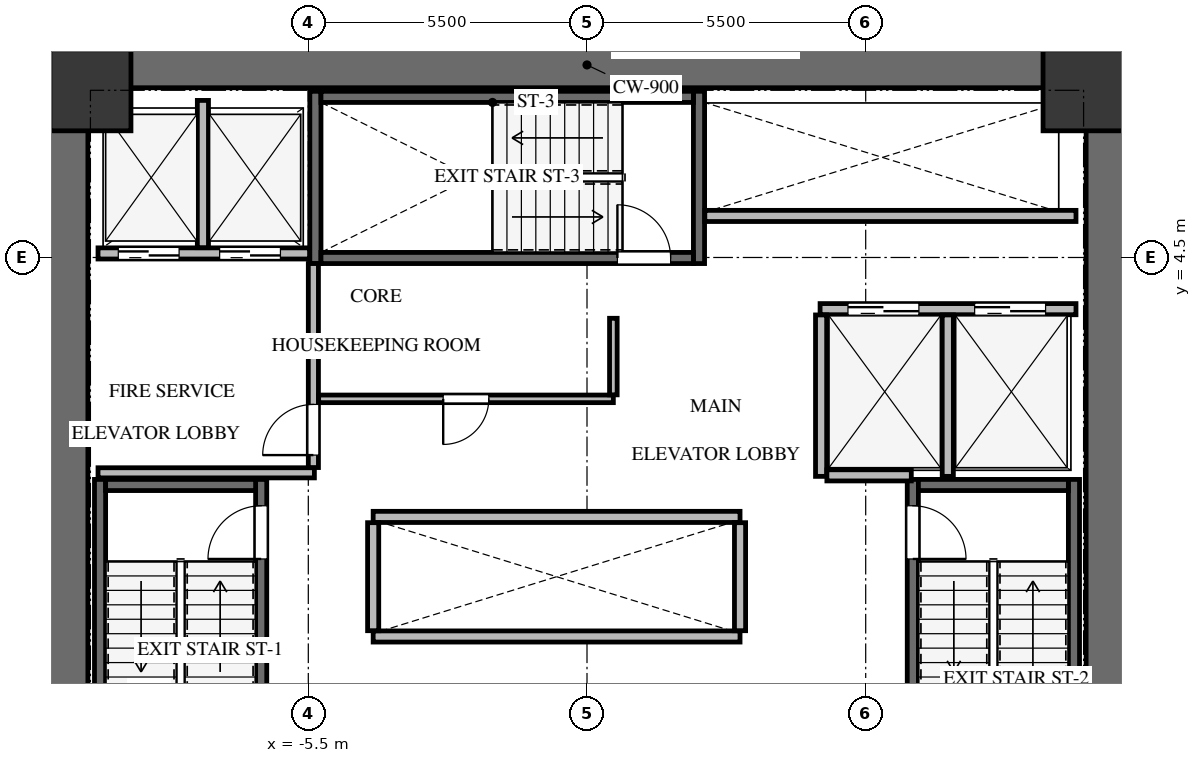
"""IFC4 building model, lengths in metres.
Left out: names, types, materials, properties, quantities, classifications, styles, units other than length and angle.
Written with IfcOpenShell. Run it as: python <this file> out.ifc"""

import sys

from ifc_helpers import new_model, si_unit, direction, frame, frame_2d, origin, origin_2d, place, context, subcontext, project, spatial, rectangle, extrude, source, transform, mapped, element, fill, save


model = new_model("IFC4")
c1 = context("Model", 3, precision=1e-05, world=origin(), true_north=direction((0.0, 1.0)))
c2 = subcontext(c1, "Body", "Model", "MODEL_VIEW")
j1 = project(units=[si_unit("LENGTHUNIT", "METRE"), si_unit("PLANEANGLEUNIT", "RADIAN")], contexts=[c1])
p1 = place(None, origin())
s1 = spatial("IfcSite", under=j1, at=p1, CompositionType="ELEMENT")
p2 = place(p1, origin())
s2 = spatial("IfcBuilding", under=s1, at=p2, CompositionType="ELEMENT")
p3 = place(p2, frame((0.0, 0.0, 72.0)))
s3 = spatial("IfcBuildingStorey", under=s2, at=p3, CompositionType="ELEMENT", Elevation=72.0)
for number, where, z_axis, x_axis in (
    (1, (-10.3, -8.75, 0.0), (0.0, 0.0, 1.0), (0.0, 1.0, 0.0)),
    (2, (10.3, -8.75, 0.0), (0.0, 0.0, 1.0), (0.0, 1.0, 0.0)),
):
    element("IfcWall", number, at=place(p3, frame(where, z_axis=z_axis, x_axis=x_axis)), inside=s3, PredefinedType="SHEAR", context=c2, shape_type="SweptSolid", body=[
        extrude(rectangle(XDim=17.5, YDim=0.9, at=frame_2d((8.75, 0.0))), origin(), (0.0, 0.0, 1.0), 3.3),
    ])
p4 = place(p3, frame((-9.85, 8.3, 0.0), z_axis=(0.0, 0.0, 1.0), x_axis=(1.0, 0.0, 0.0)))
e3 = element("IfcWall", 3, at=p4, inside=s3, PredefinedType="SHEAR", context=c2, shape_type="SweptSolid", body=[
    extrude(rectangle(XDim=19.7, YDim=0.9, at=frame_2d((9.85, 0.0))), origin(), (0.0, 0.0, 1.0), 3.3),
])
p5 = place(p3, frame((-6.43, -7.77, -0.24), z_axis=(0.0, 0.0, 1.0), x_axis=(0.0, 1.0, 0.0)))
e4 = element("IfcWall", 4, at=p5, inside=s3, PredefinedType="SHEAR", context=c2, shape_type="SweptSolid", body=[
    extrude(rectangle(XDim=7.89, YDim=0.22, at=frame_2d((3.945, 0.0))), origin(), (0.0, 0.0, 1.0), 3.3),
])
p6 = place(p5, frame((6.32, 0.0, 0.0)))
e5 = element("IfcOpeningElement", 5, at=p6, cuts=e4, PredefinedType="OPENING", context=c2, shape_type="SweptSolid", body=[
    extrude(rectangle(XDim=1.05, YDim=2.15, at=frame_2d((0.525, 1.075))), frame((0.0, 0.12, 0.0), z_axis=(0.0, -1.0, 0.0), x_axis=(1.0, 0.0, 0.0)), (0.0, 0.0, 1.0), 0.24),
])
p7 = place(p3, frame((-9.61, 0.12, -0.24), z_axis=(0.0, 0.0, 1.0), x_axis=(0.0, -1.0, 0.0)))
e6 = element("IfcWall", 6, at=p7, inside=s3, PredefinedType="SHEAR", context=c2, shape_type="SweptSolid", body=[
    extrude(rectangle(XDim=7.89, YDim=0.22, at=frame_2d((3.945, 0.0))), origin(), (0.0, 0.0, 1.0), 3.3),
])
p8 = place(p3, frame((-6.54, 0.01, -0.24), z_axis=(0.0, 0.0, 1.0), x_axis=(-1.0, 0.0, 0.0)))
e7 = element("IfcWall", 7, at=p8, inside=s3, PredefinedType="SHEAR", context=c2, shape_type="SweptSolid", body=[
    extrude(rectangle(XDim=2.96, YDim=0.22, at=frame_2d((1.48, 0.0))), origin(), (0.0, 0.0, 1.0), 3.3),
])
p9 = place(p3, frame((9.61, -7.77, -0.24), z_axis=(0.0, 0.0, 1.0), x_axis=(0.0, 1.0, 0.0)))
e8 = element("IfcWall", 8, at=p9, inside=s3, PredefinedType="SHEAR", context=c2, shape_type="SweptSolid", body=[
    extrude(rectangle(XDim=7.89, YDim=0.22, at=frame_2d((3.945, 0.0))), origin(), (0.0, 0.0, 1.0), 3.3),
])
p10 = place(p3, frame((6.43, 0.12, -0.24), z_axis=(0.0, 0.0, 1.0), x_axis=(0.0, -1.0, 0.0)))
e9 = element("IfcWall", 9, at=p10, inside=s3, PredefinedType="SHEAR", context=c2, shape_type="SweptSolid", body=[
    extrude(rectangle(XDim=7.89, YDim=0.22, at=frame_2d((3.945, 0.0))), origin(), (0.0, 0.0, 1.0), 3.3),
])
p11 = place(p10, frame((0.52, 0.0, 0.0)))
e10 = element("IfcOpeningElement", 10, at=p11, cuts=e9, PredefinedType="OPENING", context=c2, shape_type="SweptSolid", body=[
    extrude(rectangle(XDim=1.05, YDim=2.15, at=frame_2d((0.525, 1.075))), frame((0.0, 0.12, 0.0), z_axis=(0.0, -1.0, 0.0), x_axis=(1.0, 0.0, 0.0)), (0.0, 0.0, 1.0), 0.24),
])
p12 = place(p3, frame((9.5, 0.01, -0.24), z_axis=(0.0, 0.0, 1.0), x_axis=(-1.0, 0.0, 0.0)))
e11 = element("IfcWall", 11, at=p12, inside=s3, PredefinedType="SHEAR", context=c2, shape_type="SweptSolid", body=[
    extrude(rectangle(XDim=2.96, YDim=0.22, at=frame_2d((1.48, 0.0))), origin(), (0.0, 0.0, 1.0), 3.3),
])
for number, where, z_axis, x_axis in (
    (12, (2.21, 4.38, -0.24), (0.0, 0.0, 1.0), (0.0, 1.0, 0.0)),
    (13, (-5.36, 7.78, -0.24), (0.0, 0.0, 1.0), (0.0, -1.0, 0.0)),
):
    element("IfcWall", number, at=place(p3, frame(where, z_axis=z_axis, x_axis=x_axis)), inside=s3, PredefinedType="SHEAR", context=c2, shape_type="SweptSolid", body=[
        extrude(rectangle(XDim=3.4, YDim=0.22, at=frame_2d((1.7, 0.0))), origin(), (0.0, 0.0, 1.0), 3.3),
    ])
p13 = place(p3, frame((-5.25, 4.49, -0.24), z_axis=(0.0, 0.0, 1.0), x_axis=(1.0, 0.0, 0.0)))
e14 = element("IfcWall", 14, at=p13, inside=s3, PredefinedType="SHEAR", context=c2, shape_type="SweptSolid", body=[
    extrude(rectangle(XDim=7.35, YDim=0.22, at=frame_2d((3.675, 0.0))), origin(), (0.0, 0.0, 1.0), 3.3),
])
p14 = place(p13, frame((5.85, 0.0, 0.0)))
e15 = element("IfcOpeningElement", 15, at=p14, cuts=e14, PredefinedType="OPENING", context=c2, shape_type="SweptSolid", body=[
    extrude(rectangle(XDim=1.05, YDim=2.15, at=frame_2d((0.525, 1.075))), frame((0.0, 0.12, 0.0), z_axis=(0.0, -1.0, 0.0), x_axis=(1.0, 0.0, 0.0)), (0.0, 0.0, 1.0), 0.24),
])
p15 = place(p3, frame((2.1, 7.67, -0.24), z_axis=(0.0, 0.0, 1.0), x_axis=(-1.0, 0.0, 0.0)))
e16 = element("IfcWall", 16, at=p15, inside=s3, PredefinedType="SHEAR", context=c2, shape_type="SweptSolid", body=[
    extrude(rectangle(XDim=7.35, YDim=0.22, at=frame_2d((3.675, 0.0))), origin(), (0.0, 0.0, 1.0), 3.3),
])
m1 = source(origin(), c2, "Body", "SweptSolid", [
    extrude(rectangle(XDim=1.6, YDim=1.6, at=origin_2d()), origin(), (0.0, 0.0, 1.0), 3.3),
])
for number, where, z_axis, x_axis in (
    (17, (9.8, 7.8, -0.24), (0.0, 0.0, 1.0), (1.0, 0.0, 0.0)),
    (18, (-9.8, 7.8, -0.24), (0.0, 0.0, 1.0), (1.0, 0.0, 0.0)),
):
    element("IfcColumn", number, at=place(p3, frame(where, z_axis=z_axis, x_axis=x_axis)), inside=s3, PredefinedType="COLUMN", context=c2, shape_type="MappedRepresentation", body=[
        mapped(m1, transform((0.0, 0.0, 0.0), x_axis=(1.0, 0.0, 0.0), y_axis=(0.0, 1.0, 0.0), z_axis=(0.0, 0.0, 1.0), scale=1.0)),
    ])
p16 = place(p3, frame((-9.65, 4.58, 0.0), z_axis=(0.0, 0.0, 1.0), x_axis=(1.0, 0.0, 0.0)))
e19 = element("IfcWall", 19, at=p16, inside=s3, PredefinedType="SOLIDWALL", context=c2, shape_type="SweptSolid", body=[
    extrude(rectangle(XDim=4.175, YDim=0.22, at=frame_2d((2.087, 0.0))), origin(), (0.0, 0.0, 1.0), 3.045),
])
p17 = place(p16, frame((0.4, 0.0, 0.0)))
e20 = element("IfcOpeningElement", 20, at=p17, cuts=e19, PredefinedType="OPENING", context=c2, shape_type="SweptSolid", body=[
    extrude(rectangle(XDim=1.2, YDim=2.15, at=frame_2d((0.6, 1.075))), frame((0.0, 0.12, 0.0), z_axis=(0.0, -1.0, 0.0), x_axis=(1.0, 0.0, 0.0)), (0.0, 0.0, 1.0), 0.24),
])
p18 = place(p16, frame((2.4, 0.0, 0.0)))
e21 = element("IfcOpeningElement", 21, at=p18, cuts=e19, PredefinedType="OPENING", context=c2, shape_type="SweptSolid", body=[
    extrude(rectangle(XDim=1.2, YDim=2.15, at=frame_2d((0.6, 1.075))), frame((0.0, 0.12, 0.0), z_axis=(0.0, -1.0, 0.0), x_axis=(1.0, 0.0, 0.0)), (0.0, 0.0, 1.0), 0.24),
])
p19 = place(p3, frame((-7.58, 4.694, 0.0), z_axis=(0.0, 0.0, 1.0), x_axis=(0.0, 1.0, 0.0)))
e22 = element("IfcWall", 22, at=p19, inside=s3, PredefinedType="SOLIDWALL", context=c2, shape_type="SweptSolid", body=[
    extrude(rectangle(XDim=2.906, YDim=0.22, at=frame_2d((1.453, 0.0))), origin(), (0.0, 0.0, 1.0), 3.045),
])
p20 = place(p3, frame((-9.65, 0.25, 0.0), z_axis=(0.0, 0.0, 1.0), x_axis=(1.0, 0.0, 0.0)))
e23 = element("IfcWall", 23, at=p20, inside=s3, PredefinedType="SOLIDWALL", context=c2, shape_type="SweptSolid", body=[
    extrude(rectangle(XDim=4.27, YDim=0.2, at=frame_2d((2.135, 0.0))), origin(), (0.0, 0.0, 1.0), 3.045),
])
p21 = place(p3, frame((-5.4, 0.354, 0.0), z_axis=(0.0, 0.0, 1.0), x_axis=(0.0, 1.0, 0.0)))
e24 = element("IfcWall", 24, at=p21, inside=s3, PredefinedType="SOLIDWALL", context=c2, shape_type="SweptSolid", body=[
    extrude(rectangle(XDim=4.026, YDim=0.2, at=frame_2d((2.013, 0.0))), origin(), (0.0, 0.0, 1.0), 3.045),
])
p22 = place(p21, frame((0.246, 0.0, 0.0)))
e25 = element("IfcOpeningElement", 25, at=p22, cuts=e24, PredefinedType="OPENING", context=c2, shape_type="SweptSolid", body=[
    extrude(rectangle(XDim=1.0, YDim=2.15, at=frame_2d((0.5, 1.075))), frame((0.0, 0.11, 0.0), z_axis=(0.0, -1.0, 0.0), x_axis=(1.0, 0.0, 0.0)), (0.0, 0.0, 1.0), 0.22),
])
p23 = place(p3, frame((4.6, 3.48, 0.0), z_axis=(0.0, 0.0, 1.0), x_axis=(1.0, 0.0, 0.0)))
e26 = element("IfcWall", 26, at=p23, inside=s3, PredefinedType="SOLIDWALL", context=c2, shape_type="SweptSolid", body=[
    extrude(rectangle(XDim=5.05, YDim=0.22, at=frame_2d((2.525, 0.0))), origin(), (0.0, 0.0, 1.0), 3.045),
])
p24 = place(p23, frame((0.55, 0.0, 0.0)))
e27 = element("IfcOpeningElement", 27, at=p24, cuts=e26, PredefinedType="OPENING", context=c2, shape_type="SweptSolid", body=[
    extrude(rectangle(XDim=1.4, YDim=2.15, at=frame_2d((0.7, 1.075))), frame((0.0, 0.12, 0.0), z_axis=(0.0, -1.0, 0.0), x_axis=(1.0, 0.0, 0.0)), (0.0, 0.0, 1.0), 0.24),
])
p25 = place(p23, frame((3.05, 0.0, 0.0)))
e28 = element("IfcOpeningElement", 28, at=p25, cuts=e26, PredefinedType="OPENING", context=c2, shape_type="SweptSolid", body=[
    extrude(rectangle(XDim=1.4, YDim=2.15, at=frame_2d((0.7, 1.075))), frame((0.0, 0.12, 0.0), z_axis=(0.0, -1.0, 0.0), x_axis=(1.0, 0.0, 0.0)), (0.0, 0.0, 1.0), 0.24),
])
for number, where, z_axis, x_axis in (
    (29, (4.62, 0.18, 0.0), (0.0, 0.0, 1.0), (0.0, 1.0, 0.0)),
    (30, (7.12, 0.18, 0.0), (0.0, 0.0, 1.0), (0.0, 1.0, 0.0)),
):
    element("IfcWall", number, at=place(p3, frame(where, z_axis=z_axis, x_axis=x_axis)), inside=s3, PredefinedType="SOLIDWALL", context=c2, shape_type="SweptSolid", body=[
        extrude(rectangle(XDim=3.186, YDim=0.22, at=frame_2d((1.593, 0.0))), origin(), (0.0, 0.0, 1.0), 3.045),
    ])
p26 = place(p3, frame((4.734, 0.2, 0.0), z_axis=(0.0, 0.0, 1.0), x_axis=(1.0, 0.0, 0.0)))
e31 = element("IfcWall", 31, at=p26, inside=s3, PredefinedType="SOLIDWALL", context=c2, shape_type="SweptSolid", body=[
    extrude(rectangle(XDim=1.666, YDim=0.22, at=frame_2d((0.833, 0.0))), origin(), (0.0, 0.0, 1.0), 3.045),
])
for number, where, z_axis, x_axis in (
    (32, (-4.22, -2.98, 0.0), (0.0, 0.0, 1.0), (1.0, 0.0, 0.0)),
    (33, (-4.22, -0.62, 0.0), (0.0, 0.0, 1.0), (1.0, 0.0, 0.0)),
):
    element("IfcWall", number, at=place(p3, frame(where, z_axis=z_axis, x_axis=x_axis)), inside=s3, PredefinedType="SOLIDWALL", context=c2, shape_type="SweptSolid", body=[
        extrude(rectangle(XDim=7.24, YDim=0.22, at=frame_2d((3.62, 0.0))), origin(), (0.0, 0.0, 1.0), 3.045),
    ])
for number, where, z_axis, x_axis in (
    (34, (-4.22, -2.866, 0.0), (0.0, 0.0, 1.0), (0.0, 1.0, 0.0)),
    (35, (3.02, -2.866, 0.0), (0.0, 0.0, 1.0), (0.0, 1.0, 0.0)),
):
    element("IfcWall", number, at=place(p3, frame(where, z_axis=z_axis, x_axis=x_axis)), inside=s3, PredefinedType="SOLIDWALL", context=c2, shape_type="SweptSolid", body=[
        extrude(rectangle(XDim=2.132, YDim=0.22, at=frame_2d((1.066, 0.0))), origin(), (0.0, 0.0, 1.0), 3.045),
    ])
p27 = place(p3, frame((2.325, 5.32, 0.0), z_axis=(0.0, 0.0, 1.0), x_axis=(1.0, 0.0, 0.0)))
e36 = element("IfcWall", 36, at=p27, inside=s3, PredefinedType="SOLIDWALL", context=c2, shape_type="SweptSolid", body=[
    extrude(rectangle(XDim=7.325, YDim=0.22, at=frame_2d((3.663, 0.0))), origin(), (0.0, 0.0, 1.0), 3.045),
])
p28 = place(p3, frame((0.52, 1.71, 0.0), z_axis=(0.0, 0.0, 1.0), x_axis=(-1.0, 0.0, 0.0)))
e37 = element("IfcWall", 37, at=p28, inside=s3, PredefinedType="PARTITIONING", context=c2, shape_type="SweptSolid", body=[
    extrude(rectangle(XDim=5.816, YDim=0.15, at=frame_2d((2.908, 0.0))), origin(), (0.0, 0.0, 1.0), 3.045),
])
p29 = place(p28, frame((2.458, 0.0, 0.0)))
e38 = element("IfcOpeningElement", 38, at=p29, cuts=e37, PredefinedType="OPENING", context=c2, shape_type="SweptSolid", body=[
    extrude(rectangle(XDim=0.9, YDim=2.05, at=frame_2d((0.45, 1.025))), frame((0.0, 0.085, 0.0), z_axis=(0.0, -1.0, 0.0), x_axis=(1.0, 0.0, 0.0)), (0.0, 0.0, 1.0), 0.17),
])
p30 = place(p3, frame((0.52, 3.3, 0.0), z_axis=(0.0, 0.0, 1.0), x_axis=(0.0, -1.0, 0.0)))
e39 = element("IfcWall", 39, at=p30, inside=s3, PredefinedType="PARTITIONING", context=c2, shape_type="SweptSolid", body=[
    extrude(rectangle(XDim=1.511, YDim=0.15, at=frame_2d((0.755, 0.0))), origin(), (0.0, 0.0, 1.0), 3.045),
])
m2 = source(origin(), c2, "Body", "SweptSolid", [
    extrude(rectangle(XDim=1.05, YDim=2.15, at=frame_2d((0.525, 1.075))), frame((0.0, 0.025, 0.0), z_axis=(0.0, -1.0, 0.0), x_axis=(1.0, 0.0, 0.0)), (0.0, 0.0, 1.0), 0.05),
])
p31 = place(p6, origin())
e40 = element("IfcDoor", 40, at=p31, inside=s3, OperationType="SINGLE_SWING_LEFT", PredefinedType="DOOR", context=c2, shape_type="MappedRepresentation", body=[
    mapped(m2, transform((0.0, 0.0, 0.0), x_axis=(1.0, 0.0, 0.0), y_axis=(0.0, 1.0, 0.0), z_axis=(0.0, 0.0, 1.0), scale=1.0)),
])
fill(e5, e40)
m3 = source(origin(), c2, "Body", "SweptSolid", [
    extrude(rectangle(XDim=1.05, YDim=2.15, at=frame_2d((0.525, 1.075))), frame((0.0, 0.025, 0.0), z_axis=(0.0, -1.0, 0.0), x_axis=(1.0, 0.0, 0.0)), (0.0, 0.0, 1.0), 0.05),
])
p32 = place(p11, origin())
e41 = element("IfcDoor", 41, at=p32, inside=s3, OperationType="SINGLE_SWING_RIGHT", PredefinedType="DOOR", context=c2, shape_type="MappedRepresentation", body=[
    mapped(m3, transform((0.0, 0.0, 0.0), x_axis=(1.0, 0.0, 0.0), y_axis=(0.0, 1.0, 0.0), z_axis=(0.0, 0.0, 1.0), scale=1.0)),
])
fill(e10, e41)
p33 = place(p14, origin())
e42 = element("IfcDoor", 42, at=p33, inside=s3, OperationType="SINGLE_SWING_LEFT", PredefinedType="DOOR", context=c2, shape_type="MappedRepresentation", body=[
    mapped(m2, transform((0.0, 0.0, 0.0), x_axis=(1.0, 0.0, 0.0), y_axis=(0.0, 1.0, 0.0), z_axis=(0.0, 0.0, 1.0), scale=1.0)),
])
fill(e15, e42)
m4 = source(origin(), c2, "Body", "SweptSolid", [
    extrude(rectangle(XDim=1.2, YDim=2.15, at=frame_2d((0.6, 1.075))), frame((0.0, 0.025, 0.0), z_axis=(0.0, -1.0, 0.0), x_axis=(1.0, 0.0, 0.0)), (0.0, 0.0, 1.0), 0.05),
])
p34 = place(p17, origin())
e43 = element("IfcDoor", 43, at=p34, inside=s3, OperationType="DOUBLE_DOOR_SLIDING", PredefinedType="DOOR", context=c2, shape_type="MappedRepresentation", body=[
    mapped(m4, transform((0.0, 0.0, 0.0), x_axis=(1.0, 0.0, 0.0), y_axis=(0.0, 1.0, 0.0), z_axis=(0.0, 0.0, 1.0), scale=1.0)),
])
fill(e20, e43)
p35 = place(p18, origin())
e44 = element("IfcDoor", 44, at=p35, inside=s3, OperationType="DOUBLE_DOOR_SLIDING", PredefinedType="DOOR", context=c2, shape_type="MappedRepresentation", body=[
    mapped(m4, transform((0.0, 0.0, 0.0), x_axis=(1.0, 0.0, 0.0), y_axis=(0.0, 1.0, 0.0), z_axis=(0.0, 0.0, 1.0), scale=1.0)),
])
fill(e21, e44)
m5 = source(origin(), c2, "Body", "SweptSolid", [
    extrude(rectangle(XDim=1.0, YDim=2.15, at=frame_2d((0.5, 1.075))), frame((0.0, 0.025, 0.0), z_axis=(0.0, -1.0, 0.0), x_axis=(1.0, 0.0, 0.0)), (0.0, 0.0, 1.0), 0.05),
])
p36 = place(p22, origin())
e45 = element("IfcDoor", 45, at=p36, inside=s3, OperationType="SINGLE_SWING_LEFT", PredefinedType="DOOR", context=c2, shape_type="MappedRepresentation", body=[
    mapped(m5, transform((0.0, 0.0, 0.0), x_axis=(1.0, 0.0, 0.0), y_axis=(0.0, 1.0, 0.0), z_axis=(0.0, 0.0, 1.0), scale=1.0)),
])
fill(e25, e45)
m6 = source(origin(), c2, "Body", "SweptSolid", [
    extrude(rectangle(XDim=1.4, YDim=2.15, at=frame_2d((0.7, 1.075))), frame((0.0, 0.025, 0.0), z_axis=(0.0, -1.0, 0.0), x_axis=(1.0, 0.0, 0.0)), (0.0, 0.0, 1.0), 0.05),
])
p37 = place(p24, origin())
e46 = element("IfcDoor", 46, at=p37, inside=s3, OperationType="DOUBLE_DOOR_SLIDING", PredefinedType="DOOR", context=c2, shape_type="MappedRepresentation", body=[
    mapped(m6, transform((0.0, 0.0, 0.0), x_axis=(1.0, 0.0, 0.0), y_axis=(0.0, 1.0, 0.0), z_axis=(0.0, 0.0, 1.0), scale=1.0)),
])
fill(e27, e46)
p38 = place(p25, origin())
e47 = element("IfcDoor", 47, at=p38, inside=s3, OperationType="DOUBLE_DOOR_SLIDING", PredefinedType="DOOR", context=c2, shape_type="MappedRepresentation", body=[
    mapped(m6, transform((0.0, 0.0, 0.0), x_axis=(1.0, 0.0, 0.0), y_axis=(0.0, 1.0, 0.0), z_axis=(0.0, 0.0, 1.0), scale=1.0)),
])
fill(e28, e47)
m7 = source(origin(), c2, "Body", "SweptSolid", [
    extrude(rectangle(XDim=0.9, YDim=2.05, at=frame_2d((0.45, 1.025))), frame((0.0, 0.025, 0.0), z_axis=(0.0, -1.0, 0.0), x_axis=(1.0, 0.0, 0.0)), (0.0, 0.0, 1.0), 0.05),
])
p39 = place(p29, origin())
e48 = element("IfcDoor", 48, at=p39, inside=s3, OperationType="SINGLE_SWING_RIGHT", PredefinedType="DOOR", context=c2, shape_type="MappedRepresentation", body=[
    mapped(m7, transform((0.0, 0.0, 0.0), x_axis=(1.0, 0.0, 0.0), y_axis=(0.0, 1.0, 0.0), z_axis=(0.0, 0.0, 1.0), scale=1.0)),
])
fill(e38, e48)
save(model, sys.argv[1])
